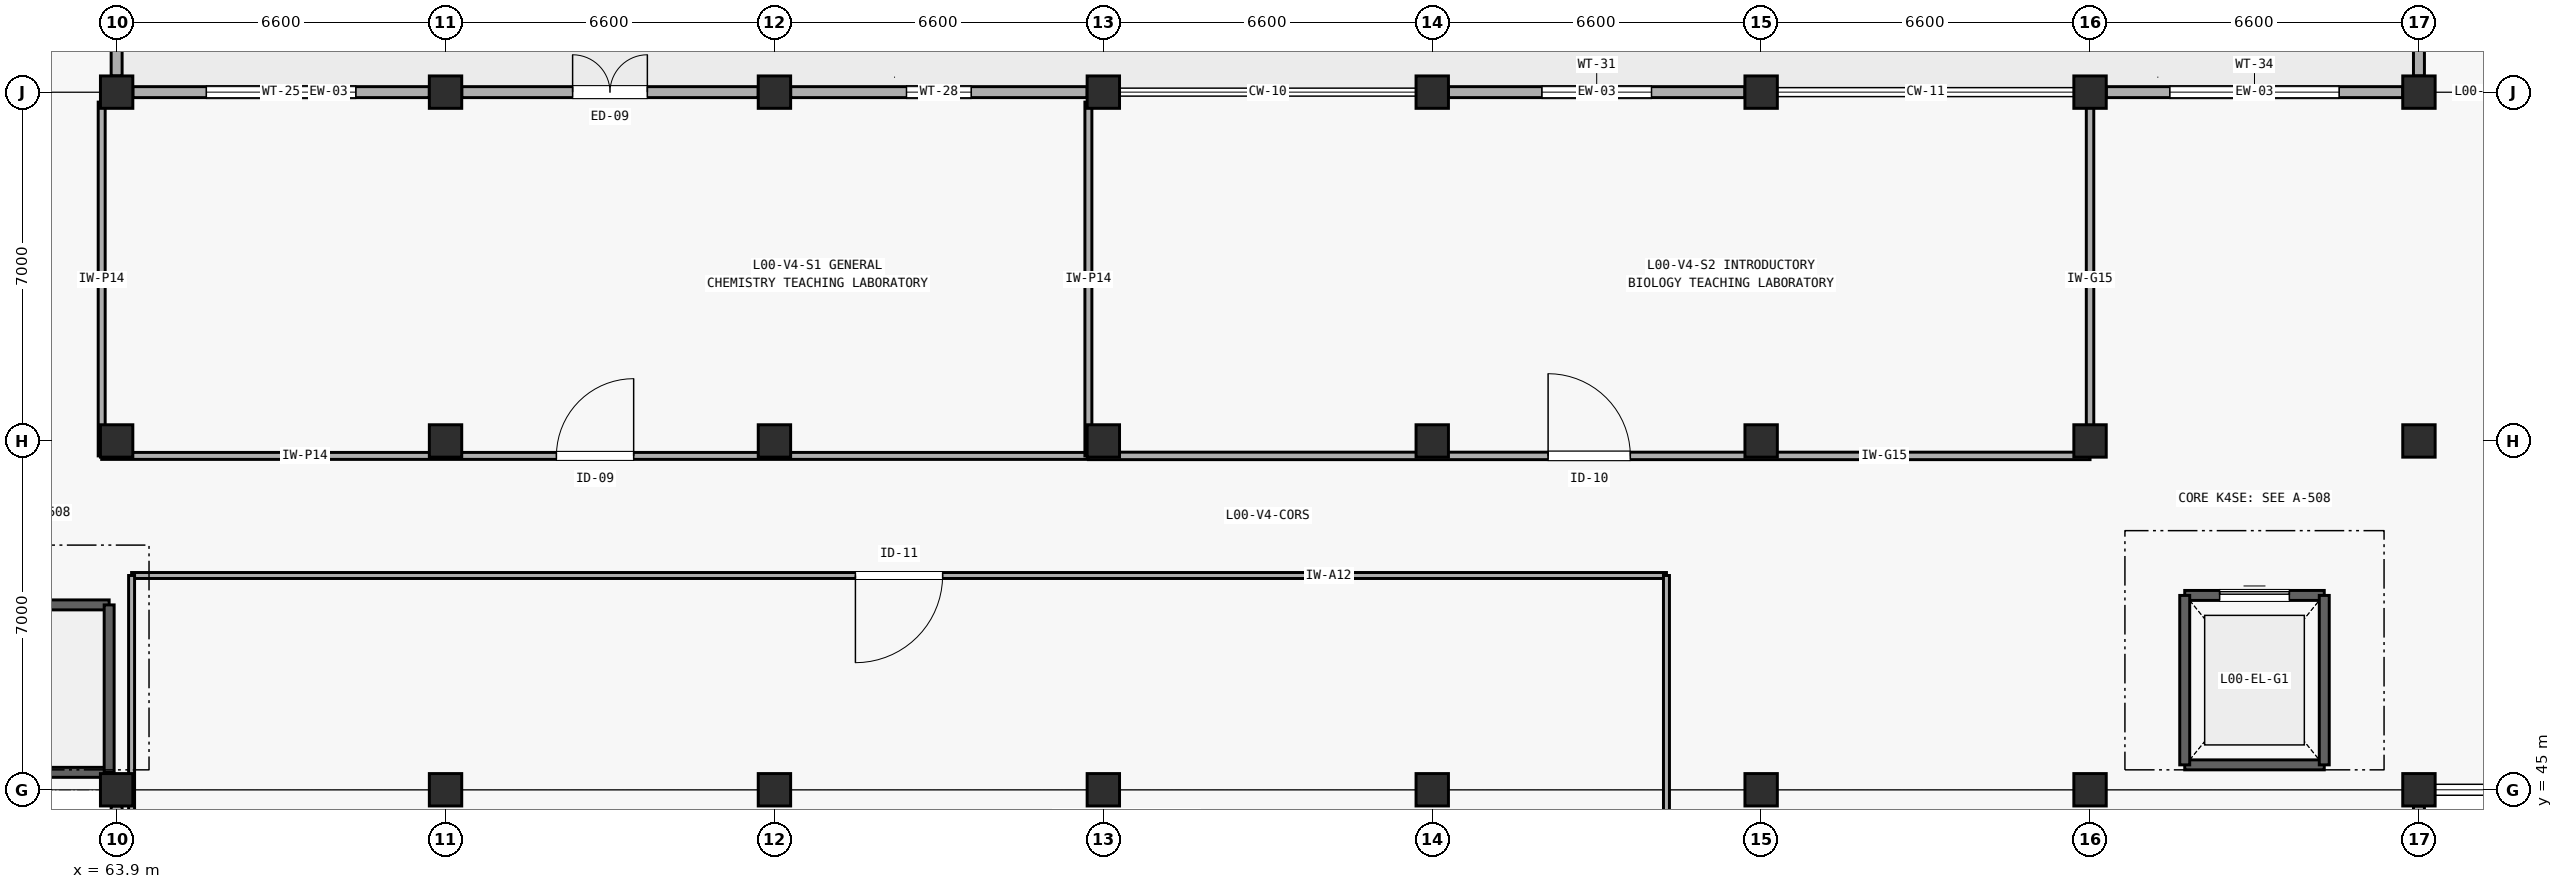
"""IFC4 building model, lengths in metres.
Left out: names, types, materials, properties, quantities, classifications, styles, units other than length and angle.
Written with IfcOpenShell. Run it as: python <this file> out.ifc"""

import sys

from ifc_helpers import new_model, si_unit, direction, frame, frame_2d, origin, origin_2d, place, context, subcontext, project, spatial, rectangle, extrude, element, fill, save


model = new_model("IFC4")
c1 = context("Model", 3, precision=1e-05, world=origin(), true_north=direction((0.0, 1.0)))
c2 = subcontext(c1, "Body", "Model", "MODEL_VIEW")
j1 = project(units=[si_unit("LENGTHUNIT", "METRE"), si_unit("PLANEANGLEUNIT", "RADIAN")], contexts=[c1])
p1 = place(None, origin())
s1 = spatial("IfcSite", under=j1, at=p1, CompositionType="ELEMENT")
p2 = place(p1, origin())
s2 = spatial("IfcBuilding", under=s1, at=p2, CompositionType="ELEMENT")
p3 = place(p2, origin())
s3 = spatial("IfcBuildingStorey", under=s2, at=p3, CompositionType="ELEMENT", Elevation=0.0)
for number, where, z_axis, x_axis in (
    (1, (63.9, 45.0, 0.0), (0.0, 0.0, 1.0), (1.0, 0.0, 0.0)),
    (2, (63.9, 52.0, 0.0), (0.0, 0.0, 1.0), (1.0, 0.0, 0.0)),
    (3, (63.9, 59.0, 0.0), (0.0, 0.0, 1.0), (1.0, 0.0, 0.0)),
    (4, (70.5, 45.0, 0.0), (0.0, 0.0, 1.0), (1.0, 0.0, 0.0)),
    (5, (70.5, 52.0, 0.0), (0.0, 0.0, 1.0), (1.0, 0.0, 0.0)),
    (6, (70.5, 59.0, 0.0), (0.0, 0.0, 1.0), (1.0, 0.0, 0.0)),
    (7, (77.1, 45.0, 0.0), (0.0, 0.0, 1.0), (1.0, 0.0, 0.0)),
    (8, (77.1, 52.0, 0.0), (0.0, 0.0, 1.0), (1.0, 0.0, 0.0)),
    (9, (77.1, 59.0, 0.0), (0.0, 0.0, 1.0), (1.0, 0.0, 0.0)),
    (10, (83.7, 45.0, 0.0), (0.0, 0.0, 1.0), (1.0, 0.0, 0.0)),
    (11, (83.7, 52.0, 0.0), (0.0, 0.0, 1.0), (1.0, 0.0, 0.0)),
    (12, (83.7, 59.0, 0.0), (0.0, 0.0, 1.0), (1.0, 0.0, 0.0)),
    (13, (90.3, 45.0, 0.0), (0.0, 0.0, 1.0), (1.0, 0.0, 0.0)),
    (14, (90.3, 52.0, 0.0), (0.0, 0.0, 1.0), (1.0, 0.0, 0.0)),
    (15, (90.3, 59.0, 0.0), (0.0, 0.0, 1.0), (1.0, 0.0, 0.0)),
    (16, (96.9, 45.0, 0.0), (0.0, 0.0, 1.0), (1.0, 0.0, 0.0)),
    (17, (96.9, 52.0, 0.0), (0.0, 0.0, 1.0), (1.0, 0.0, 0.0)),
    (18, (96.9, 59.0, 0.0), (0.0, 0.0, 1.0), (1.0, 0.0, 0.0)),
    (19, (103.5, 45.0, 0.0), (0.0, 0.0, 1.0), (1.0, 0.0, 0.0)),
    (20, (103.5, 52.0, 0.0), (0.0, 0.0, 1.0), (1.0, 0.0, 0.0)),
    (21, (103.5, 59.0, 0.0), (0.0, 0.0, 1.0), (1.0, 0.0, 0.0)),
    (22, (110.1, 45.0, 0.0), (0.0, 0.0, 1.0), (1.0, 0.0, 0.0)),
    (23, (110.1, 52.0, 0.0), (0.0, 0.0, 1.0), (1.0, 0.0, 0.0)),
    (24, (110.1, 59.0, 0.0), (0.0, 0.0, 1.0), (1.0, 0.0, 0.0)),
):
    element("IfcColumn", number, at=place(p3, frame(where, z_axis=z_axis, x_axis=x_axis)), inside=s3, PredefinedType="COLUMN", context=c2, shape_type="SweptSolid", body=[
        extrude(rectangle(XDim=0.65, YDim=0.65, at=origin_2d()), origin(), (0.0, 0.0, 1.0), 4.2),
    ])
p4 = place(p3, frame((64.225, 59.0, 0.0), z_axis=(0.0, 0.0, 1.0), x_axis=(1.0, 0.0, 0.0)))
e25 = element("IfcWall", 25, at=p4, inside=s3, PredefinedType="SOLIDWALL", context=c2, shape_type="SweptSolid", body=[
    extrude(rectangle(XDim=5.95, YDim=0.22, at=frame_2d((2.975, 0.0))), origin(), (0.0, 0.0, 1.0), 3.345),
])
p5 = place(p4, frame((1.475, 0.0, 0.85)))
e26 = element("IfcOpeningElement", 26, at=p5, cuts=e25, PredefinedType="OPENING", context=c2, shape_type="SweptSolid", body=[
    extrude(rectangle(XDim=3.0, YDim=1.6, at=frame_2d((1.5, 0.8))), frame((0.0, 0.12, 0.0), z_axis=(0.0, -1.0, 0.0), x_axis=(1.0, 0.0, 0.0)), (0.0, 0.0, 1.0), 0.24),
])
p6 = place(p3, frame((70.825, 59.0, 0.0), z_axis=(0.0, 0.0, 1.0), x_axis=(1.0, 0.0, 0.0)))
e27 = element("IfcWall", 27, at=p6, inside=s3, PredefinedType="SOLIDWALL", context=c2, shape_type="SweptSolid", body=[
    extrude(rectangle(XDim=5.95, YDim=0.22, at=frame_2d((2.975, 0.0))), origin(), (0.0, 0.0, 1.0), 3.345),
])
p7 = place(p6, frame((2.225, 0.0, 0.0)))
e28 = element("IfcOpeningElement", 28, at=p7, cuts=e27, PredefinedType="OPENING", context=c2, shape_type="SweptSolid", body=[
    extrude(rectangle(XDim=1.5, YDim=2.15, at=frame_2d((0.75, 1.075))), frame((0.0, 0.12, 0.0), z_axis=(0.0, -1.0, 0.0), x_axis=(1.0, 0.0, 0.0)), (0.0, 0.0, 1.0), 0.24),
])
p8 = place(p3, frame((77.425, 59.0, 0.0), z_axis=(0.0, 0.0, 1.0), x_axis=(1.0, 0.0, 0.0)))
e29 = element("IfcWall", 29, at=p8, inside=s3, PredefinedType="SOLIDWALL", context=c2, shape_type="SweptSolid", body=[
    extrude(rectangle(XDim=5.95, YDim=0.22, at=frame_2d((2.975, 0.0))), origin(), (0.0, 0.0, 1.0), 3.135),
])
p9 = place(p8, frame((2.325, 0.0, 0.85)))
e30 = element("IfcOpeningElement", 30, at=p9, cuts=e29, PredefinedType="OPENING", context=c2, shape_type="SweptSolid", body=[
    extrude(rectangle(XDim=1.3, YDim=1.45, at=frame_2d((0.65, 0.725))), frame((0.0, 0.12, 0.0), z_axis=(0.0, -1.0, 0.0), x_axis=(1.0, 0.0, 0.0)), (0.0, 0.0, 1.0), 0.24),
])
p10 = place(p3, frame((90.625, 59.0, 0.0), z_axis=(0.0, 0.0, 1.0), x_axis=(1.0, 0.0, 0.0)))
e31 = element("IfcWall", 31, at=p10, inside=s3, PredefinedType="SOLIDWALL", context=c2, shape_type="SweptSolid", body=[
    extrude(rectangle(XDim=5.95, YDim=0.22, at=frame_2d((2.975, 0.0))), origin(), (0.0, 0.0, 1.0), 3.235),
])
p11 = place(p10, frame((1.875, 0.0, 0.85)))
e32 = element("IfcOpeningElement", 32, at=p11, cuts=e31, PredefinedType="OPENING", context=c2, shape_type="SweptSolid", body=[
    extrude(rectangle(XDim=2.2, YDim=1.2, at=frame_2d((1.1, 0.6))), frame((0.0, 0.12, 0.0), z_axis=(0.0, -1.0, 0.0), x_axis=(1.0, 0.0, 0.0)), (0.0, 0.0, 1.0), 0.24),
])
p12 = place(p3, frame((103.825, 59.0, 0.0), z_axis=(0.0, 0.0, 1.0), x_axis=(1.0, 0.0, 0.0)))
e33 = element("IfcWall", 33, at=p12, inside=s3, PredefinedType="SOLIDWALL", context=c2, shape_type="SweptSolid", body=[
    extrude(rectangle(XDim=5.95, YDim=0.22, at=frame_2d((2.975, 0.0))), origin(), (0.0, 0.0, 1.0), 3.365),
])
p13 = place(p12, frame((1.275, 0.0, 0.85)))
e34 = element("IfcOpeningElement", 34, at=p13, cuts=e33, PredefinedType="OPENING", context=c2, shape_type="SweptSolid", body=[
    extrude(rectangle(XDim=3.4, YDim=1.2, at=frame_2d((1.7, 0.6))), frame((0.0, 0.12, 0.0), z_axis=(0.0, -1.0, 0.0), x_axis=(1.0, 0.0, 0.0)), (0.0, 0.0, 1.0), 0.24),
])
p14 = place(p3, frame((63.9, 38.35, 0.0), z_axis=(0.0, 0.0, 1.0), x_axis=(0.0, 1.0, 0.0)))
e35 = element("IfcWall", 35, at=p14, inside=s3, PredefinedType="SOLIDWALL", context=c2, shape_type="SweptSolid", body=[
    extrude(rectangle(XDim=6.325, YDim=0.22, at=frame_2d((3.163, 0.0))), origin(), (0.0, 0.0, 1.0), 3.465),
])
p15 = place(p14, frame((2.262, 0.0, 0.85)))
e36 = element("IfcOpeningElement", 36, at=p15, cuts=e35, PredefinedType="OPENING", context=c2, shape_type="SweptSolid", body=[
    extrude(rectangle(XDim=1.8, YDim=1.35, at=frame_2d((0.9, 0.675))), frame((0.0, 0.12, 0.0), z_axis=(0.0, -1.0, 0.0), x_axis=(1.0, 0.0, 0.0)), (0.0, 0.0, 1.0), 0.24),
])
p16 = place(p3, frame((63.9, 59.325, 0.0), z_axis=(0.0, 0.0, 1.0), x_axis=(0.0, 1.0, 0.0)))
e37 = element("IfcWall", 37, at=p16, inside=s3, PredefinedType="SOLIDWALL", context=c2, shape_type="SweptSolid", body=[
    extrude(rectangle(XDim=6.35, YDim=0.22, at=frame_2d((3.175, 0.0))), origin(), (0.0, 0.0, 1.0), 3.465),
])
p17 = place(p16, frame((1.975, 0.0, 0.85)))
e38 = element("IfcOpeningElement", 38, at=p17, cuts=e37, PredefinedType="OPENING", context=c2, shape_type="SweptSolid", body=[
    extrude(rectangle(XDim=2.4, YDim=1.35, at=frame_2d((1.2, 0.675))), frame((0.0, 0.12, 0.0), z_axis=(0.0, -1.0, 0.0), x_axis=(1.0, 0.0, 0.0)), (0.0, 0.0, 1.0), 0.24),
])
p18 = place(p3, frame((110.1, 38.35, 0.0), z_axis=(0.0, 0.0, 1.0), x_axis=(0.0, 1.0, 0.0)))
e39 = element("IfcWall", 39, at=p18, inside=s3, PredefinedType="SOLIDWALL", context=c2, shape_type="SweptSolid", body=[
    extrude(rectangle(XDim=6.325, YDim=0.22, at=frame_2d((3.163, 0.0))), origin(), (0.0, 0.0, 1.0), 3.565),
])
p19 = place(p18, frame((1.812, 0.0, 0.85)))
e40 = element("IfcOpeningElement", 40, at=p19, cuts=e39, PredefinedType="OPENING", context=c2, shape_type="SweptSolid", body=[
    extrude(rectangle(XDim=2.7, YDim=1.5, at=frame_2d((1.35, 0.75))), frame((0.0, 0.12, 0.0), z_axis=(0.0, -1.0, 0.0), x_axis=(1.0, 0.0, 0.0)), (0.0, 0.0, 1.0), 0.24),
])
p20 = place(p3, frame((110.1, 59.325, 0.0), z_axis=(0.0, 0.0, 1.0), x_axis=(0.0, 1.0, 0.0)))
e41 = element("IfcWall", 41, at=p20, inside=s3, PredefinedType="SOLIDWALL", context=c2, shape_type="SweptSolid", body=[
    extrude(rectangle(XDim=6.35, YDim=0.22, at=frame_2d((3.175, 0.0))), origin(), (0.0, 0.0, 1.0), 3.565),
])
p21 = place(p20, frame((2.475, 0.0, 0.85)))
e42 = element("IfcOpeningElement", 42, at=p21, cuts=e41, PredefinedType="OPENING", context=c2, shape_type="SweptSolid", body=[
    extrude(rectangle(XDim=1.4, YDim=1.25, at=frame_2d((0.7, 0.625))), frame((0.0, 0.12, 0.0), z_axis=(0.0, -1.0, 0.0), x_axis=(1.0, 0.0, 0.0)), (0.0, 0.0, 1.0), 0.24),
])
p22 = place(p3, frame((57.45, 45.35, 0.0), z_axis=(0.0, 0.0, 1.0), x_axis=(1.0, 0.0, 0.0)))
e43 = element("IfcWall", 43, at=p22, inside=s3, PredefinedType="SHEAR", context=c2, shape_type="SweptSolid", body=[
    extrude(rectangle(XDim=6.3, YDim=0.2, at=frame_2d((3.15, 0.0))), origin(), (0.0, 0.0, 1.0), 4.2),
])
p23 = place(p3, frame((57.45, 48.71, 0.0), z_axis=(0.0, 0.0, 1.0), x_axis=(1.0, 0.0, 0.0)))
e44 = element("IfcWall", 44, at=p23, inside=s3, PredefinedType="SHEAR", context=c2, shape_type="SweptSolid", body=[
    extrude(rectangle(XDim=6.3, YDim=0.2, at=frame_2d((3.15, 0.0))), origin(), (0.0, 0.0, 1.0), 4.2),
])
p24 = place(p23, frame((0.32, 0.0, 0.0)))
e45 = element("IfcOpeningElement", 45, at=p24, cuts=e44, PredefinedType="OPENING", context=c2, shape_type="SweptSolid", body=[
    extrude(rectangle(XDim=1.2, YDim=2.15, at=frame_2d((0.6, 1.075))), frame((0.0, 0.11, 0.0), z_axis=(0.0, -1.0, 0.0), x_axis=(1.0, 0.0, 0.0)), (0.0, 0.0, 1.0), 0.22),
])
p25 = place(p3, frame((63.75, 45.35, 0.0), z_axis=(0.0, 0.0, 1.0), x_axis=(0.0, 1.0, 0.0)))
e46 = element("IfcWall", 46, at=p25, inside=s3, PredefinedType="SHEAR", context=c2, shape_type="SweptSolid", body=[
    extrude(rectangle(XDim=3.36, YDim=0.2, at=frame_2d((1.68, 0.0))), origin(), (0.0, 0.0, 1.0), 4.2),
])
p26 = place(p3, frame((105.4, 45.5, 0.0), z_axis=(0.0, 0.0, 1.0), x_axis=(1.0, 0.0, 0.0)))
e47 = element("IfcWall", 47, at=p26, inside=s3, PredefinedType="SHEAR", context=c2, shape_type="SweptSolid", body=[
    extrude(rectangle(XDim=2.8, YDim=0.2, at=frame_2d((1.4, 0.0))), origin(), (0.0, 0.0, 1.0), 4.2),
])
p27 = place(p3, frame((105.4, 48.9, 0.0), z_axis=(0.0, 0.0, 1.0), x_axis=(1.0, 0.0, 0.0)))
e48 = element("IfcWall", 48, at=p27, inside=s3, PredefinedType="SHEAR", context=c2, shape_type="SweptSolid", body=[
    extrude(rectangle(XDim=2.8, YDim=0.2, at=frame_2d((1.4, 0.0))), origin(), (0.0, 0.0, 1.0), 4.2),
])
p28 = place(p27, frame((0.7, 0.0, 0.0)))
e49 = element("IfcOpeningElement", 49, at=p28, cuts=e48, PredefinedType="OPENING", context=c2, shape_type="SweptSolid", body=[
    extrude(rectangle(XDim=1.4, YDim=2.3, at=frame_2d((0.7, 1.15))), frame((0.0, 0.11, 0.0), z_axis=(0.0, -1.0, 0.0), x_axis=(1.0, 0.0, 0.0)), (0.0, 0.0, 1.0), 0.22),
])
for number, where, z_axis, x_axis in (
    (50, (105.4, 45.5, 0.0), (0.0, 0.0, 1.0), (0.0, 1.0, 0.0)),
    (51, (108.2, 45.5, 0.0), (0.0, 0.0, 1.0), (0.0, 1.0, 0.0)),
):
    element("IfcWall", number, at=place(p3, frame(where, z_axis=z_axis, x_axis=x_axis)), inside=s3, PredefinedType="SHEAR", context=c2, shape_type="SweptSolid", body=[
        extrude(rectangle(XDim=3.4, YDim=0.2, at=frame_2d((1.7, 0.0))), origin(), (0.0, 0.0, 1.0), 4.2),
    ])
p29 = place(p3, frame((63.6, 51.7, 0.0), z_axis=(0.0, 0.0, 1.0), x_axis=(1.0, 0.0, 0.0)))
e52 = element("IfcWall", 52, at=p29, inside=s3, PredefinedType="PLUMBINGWALL", context=c2, shape_type="SweptSolid", body=[
    extrude(rectangle(XDim=19.8, YDim=0.14, at=frame_2d((9.9, 0.0))), origin(), (0.0, 0.0, 1.0), 3.135),
])
p30 = place(p29, frame((9.125, 0.0, 0.0)))
e53 = element("IfcOpeningElement", 53, at=p30, cuts=e52, PredefinedType="OPENING", context=c2, shape_type="SweptSolid", body=[
    extrude(rectangle(XDim=1.55, YDim=2.2, at=frame_2d((0.775, 1.1))), frame((0.0, 0.08, 0.0), z_axis=(0.0, -1.0, 0.0), x_axis=(1.0, 0.0, 0.0)), (0.0, 0.0, 1.0), 0.16),
])
for number, where, z_axis, x_axis in (
    (54, (63.6, 51.7, 0.0), (0.0, 0.0, 1.0), (0.0, 1.0, 0.0)),
    (55, (83.4, 51.7, 0.0), (0.0, 0.0, 1.0), (0.0, 1.0, 0.0)),
):
    element("IfcWall", number, at=place(p3, frame(where, z_axis=z_axis, x_axis=x_axis)), inside=s3, PredefinedType="PLUMBINGWALL", context=c2, shape_type="SweptSolid", body=[
        extrude(rectangle(XDim=7.1, YDim=0.14, at=frame_2d((3.55, 0.0))), origin(), (0.0, 0.0, 1.0), 3.425),
    ])
p31 = place(p3, frame((83.4, 51.7, 0.0), z_axis=(0.0, 0.0, 1.0), x_axis=(1.0, 0.0, 0.0)))
e56 = element("IfcWall", 56, at=p31, inside=s3, PredefinedType="PARTITIONING", context=c2, shape_type="SweptSolid", body=[
    extrude(rectangle(XDim=20.1, YDim=0.15, at=frame_2d((10.05, 0.0))), origin(), (0.0, 0.0, 1.0), 3.235),
])
p32 = place(p31, frame((9.225, 0.0, 0.0)))
e57 = element("IfcOpeningElement", 57, at=p32, cuts=e56, PredefinedType="OPENING", context=c2, shape_type="SweptSolid", body=[
    extrude(rectangle(XDim=1.65, YDim=2.25, at=frame_2d((0.825, 1.125))), frame((0.0, 0.085, 0.0), z_axis=(0.0, -1.0, 0.0), x_axis=(1.0, 0.0, 0.0)), (0.0, 0.0, 1.0), 0.17),
])
p33 = place(p3, frame((103.5, 51.7, 0.0), z_axis=(0.0, 0.0, 1.0), x_axis=(0.0, 1.0, 0.0)))
e58 = element("IfcWall", 58, at=p33, inside=s3, PredefinedType="PARTITIONING", context=c2, shape_type="SweptSolid", body=[
    extrude(rectangle(XDim=7.1, YDim=0.15, at=frame_2d((3.55, 0.0))), origin(), (0.0, 0.0, 1.0), 3.425),
])
p34 = place(p3, frame((64.2, 49.3, 0.0), z_axis=(0.0, 0.0, 1.0), x_axis=(1.0, 0.0, 0.0)))
e59 = element("IfcWall", 59, at=p34, inside=s3, PredefinedType="PARTITIONING", context=c2, shape_type="SweptSolid", body=[
    extrude(rectangle(XDim=30.8, YDim=0.12, at=frame_2d((15.4, 0.0))), origin(), (0.0, 0.0, 1.0), 3.9),
])
p35 = place(p34, frame((14.525, 0.0, 0.0)))
e60 = element("IfcOpeningElement", 60, at=p35, cuts=e59, PredefinedType="OPENING", context=c2, shape_type="SweptSolid", body=[
    extrude(rectangle(XDim=1.75, YDim=2.25, at=frame_2d((0.875, 1.125))), frame((0.0, 0.07, 0.0), z_axis=(0.0, -1.0, 0.0), x_axis=(1.0, 0.0, 0.0)), (0.0, 0.0, 1.0), 0.14),
])
p36 = place(p3, frame((64.2, 38.2, 0.0), z_axis=(0.0, 0.0, 1.0), x_axis=(0.0, 1.0, 0.0)))
e61 = element("IfcWall", 61, at=p36, inside=s3, PredefinedType="PARTITIONING", context=c2, shape_type="SweptSolid", body=[
    extrude(rectangle(XDim=11.1, YDim=0.12, at=frame_2d((5.55, 0.0))), origin(), (0.0, 0.0, 1.0), 3.465),
])
p37 = place(p3, frame((95.0, 38.2, 0.0), z_axis=(0.0, 0.0, 1.0), x_axis=(0.0, 1.0, 0.0)))
e62 = element("IfcWall", 62, at=p37, inside=s3, PredefinedType="PARTITIONING", context=c2, shape_type="SweptSolid", body=[
    extrude(rectangle(XDim=11.1, YDim=0.12, at=frame_2d((5.55, 0.0))), origin(), (0.0, 0.0, 1.0), 3.9),
])
p38 = place(p5, origin())
e63 = element("IfcWindow", 63, at=p38, inside=s3, PartitioningType="SINGLE_PANEL", PredefinedType="WINDOW", context=c2, shape_type="SweptSolid", body=[
    extrude(rectangle(XDim=3.0, YDim=1.6, at=frame_2d((1.5, 0.8))), frame((0.0, 0.03, 0.0), z_axis=(0.0, -1.0, 0.0), x_axis=(1.0, 0.0, 0.0)), (0.0, 0.0, 1.0), 0.06),
])
fill(e26, e63)
p39 = place(p7, origin())
e64 = element("IfcDoor", 64, at=p39, inside=s3, OperationType="DOUBLE_DOOR_SINGLE_SWING", PredefinedType="DOOR", context=c2, shape_type="SweptSolid", body=[
    extrude(rectangle(XDim=1.5, YDim=2.15, at=frame_2d((0.75, 1.075))), frame((0.0, 0.025, 0.0), z_axis=(0.0, -1.0, 0.0), x_axis=(1.0, 0.0, 0.0)), (0.0, 0.0, 1.0), 0.05),
])
fill(e28, e64)
p40 = place(p9, origin())
e65 = element("IfcWindow", 65, at=p40, inside=s3, PartitioningType="SINGLE_PANEL", PredefinedType="WINDOW", context=c2, shape_type="SweptSolid", body=[
    extrude(rectangle(XDim=1.3, YDim=1.45, at=frame_2d((0.65, 0.725))), frame((0.0, 0.03, 0.0), z_axis=(0.0, -1.0, 0.0), x_axis=(1.0, 0.0, 0.0)), (0.0, 0.0, 1.0), 0.06),
])
fill(e30, e65)
p41 = place(p11, origin())
e66 = element("IfcWindow", 66, at=p41, inside=s3, PartitioningType="SINGLE_PANEL", PredefinedType="WINDOW", context=c2, shape_type="SweptSolid", body=[
    extrude(rectangle(XDim=2.2, YDim=1.2, at=frame_2d((1.1, 0.6))), frame((0.0, 0.03, 0.0), z_axis=(0.0, -1.0, 0.0), x_axis=(1.0, 0.0, 0.0)), (0.0, 0.0, 1.0), 0.06),
])
fill(e32, e66)
p42 = place(p13, origin())
e67 = element("IfcWindow", 67, at=p42, inside=s3, PartitioningType="SINGLE_PANEL", PredefinedType="WINDOW", context=c2, shape_type="SweptSolid", body=[
    extrude(rectangle(XDim=3.4, YDim=1.2, at=frame_2d((1.7, 0.6))), frame((0.0, 0.03, 0.0), z_axis=(0.0, -1.0, 0.0), x_axis=(1.0, 0.0, 0.0)), (0.0, 0.0, 1.0), 0.06),
])
fill(e34, e67)
p43 = place(p28, origin())
e68 = element("IfcDoor", 68, at=p43, inside=s3, OperationType="SLIDING_TO_LEFT", PredefinedType="DOOR", context=c2, shape_type="SweptSolid", body=[
    extrude(rectangle(XDim=1.4, YDim=2.3, at=frame_2d((0.7, 1.15))), frame((0.0, 0.025, 0.0), z_axis=(0.0, -1.0, 0.0), x_axis=(1.0, 0.0, 0.0)), (0.0, 0.0, 1.0), 0.05),
])
fill(e49, e68)
p44 = place(p30, origin())
e69 = element("IfcDoor", 69, at=p44, inside=s3, OperationType="SINGLE_SWING_RIGHT", PredefinedType="DOOR", context=c2, shape_type="SweptSolid", body=[
    extrude(rectangle(XDim=1.55, YDim=2.2, at=frame_2d((0.775, 1.1))), frame((0.0, 0.025, 0.0), z_axis=(0.0, -1.0, 0.0), x_axis=(1.0, 0.0, 0.0)), (0.0, 0.0, 1.0), 0.05),
])
fill(e53, e69)
p45 = place(p32, origin())
e70 = element("IfcDoor", 70, at=p45, inside=s3, OperationType="SINGLE_SWING_LEFT", PredefinedType="DOOR", context=c2, shape_type="SweptSolid", body=[
    extrude(rectangle(XDim=1.65, YDim=2.25, at=frame_2d((0.825, 1.125))), frame((0.0, 0.025, 0.0), z_axis=(0.0, -1.0, 0.0), x_axis=(1.0, 0.0, 0.0)), (0.0, 0.0, 1.0), 0.05),
])
fill(e57, e70)
p46 = place(p35, frame((1.75, 0.0, 0.0), z_axis=(0.0, 0.0, 1.0), x_axis=(-1.0, 0.0, 0.0)))
e71 = element("IfcDoor", 71, at=p46, inside=s3, OperationType="SINGLE_SWING_RIGHT", PredefinedType="DOOR", context=c2, shape_type="SweptSolid", body=[
    extrude(rectangle(XDim=1.75, YDim=2.25, at=frame_2d((0.875, 1.125))), frame((0.0, 0.025, 0.0), z_axis=(0.0, -1.0, 0.0), x_axis=(1.0, 0.0, 0.0)), (0.0, 0.0, 1.0), 0.05),
])
fill(e60, e71)
save(model, sys.argv[1])
